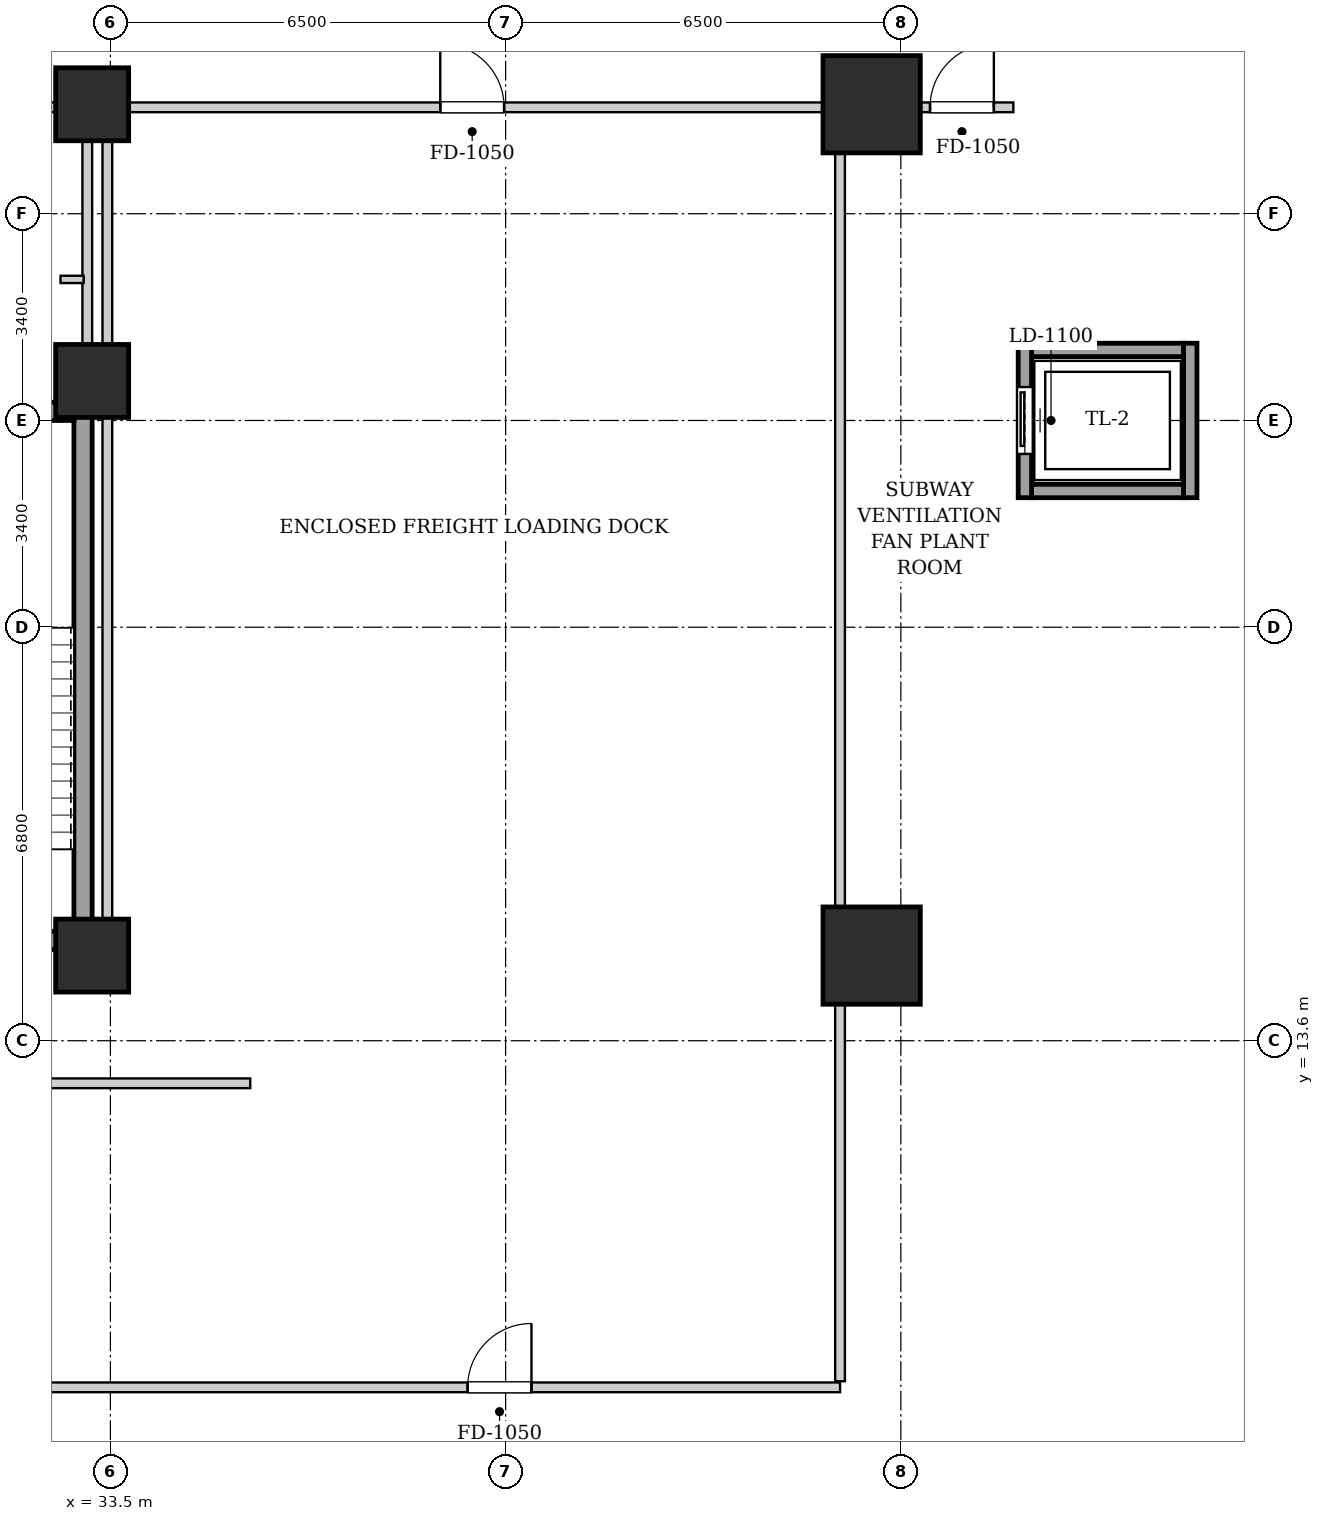
"""IFC4 building model, lengths in metres.
Left out: names, types, materials, properties, quantities, classifications, styles, units other than length and angle.
Written with IfcOpenShell. Run it as: python <this file> out.ifc"""

import sys

from ifc_helpers import new_model, si_unit, direction, frame, frame_2d, origin, origin_2d, place, context, subcontext, project, spatial, rectangle, extrude, element, fill, save


model = new_model("IFC4")
c1 = context("Model", 3, precision=1e-05, world=origin(), true_north=direction((0.0, 1.0)))
c2 = subcontext(c1, "Body", "Model", "MODEL_VIEW")
j1 = project(units=[si_unit("LENGTHUNIT", "METRE"), si_unit("PLANEANGLEUNIT", "RADIAN")], contexts=[c1])
p1 = place(None, origin())
s1 = spatial("IfcSite", under=j1, at=p1, CompositionType="ELEMENT")
p2 = place(p1, origin())
s2 = spatial("IfcBuilding", under=s1, at=p2, CompositionType="ELEMENT")
p3 = place(p2, frame((0.0, 0.0, -4.8)))
s3 = spatial("IfcBuildingStorey", under=s2, at=p3, CompositionType="ELEMENT", Elevation=-4.8)
for number, where, z_axis, x_axis in (
    (1, (46.02, 15.0, 0.0), (0.0, 0.0, 1.0), (1.0, 0.0, 0.0)),
    (2, (46.02, 29.0, 0.0), (0.0, 0.0, 1.0), (1.0, 0.0, 0.0)),
):
    element("IfcColumn", number, at=place(p3, frame(where, z_axis=z_axis, x_axis=x_axis)), inside=s3, PredefinedType="COLUMN", context=c2, shape_type="SweptSolid", body=[
        extrude(rectangle(XDim=1.6, YDim=1.6, at=origin_2d()), origin(), (0.0, 0.0, 1.0), 4.8),
    ])
for number, where, z_axis, x_axis in (
    (3, (33.2, 15.0, 0.0), (0.0, 0.0, 1.0), (1.0, 0.0, 0.0)),
    (4, (33.2, 29.0, 0.0), (0.0, 0.0, 1.0), (1.0, 0.0, 0.0)),
    (5, (33.2, 24.45, 0.0), (0.0, 0.0, 1.0), (1.0, 0.0, 0.0)),
):
    element("IfcColumn", number, at=place(p3, frame(where, z_axis=z_axis, x_axis=x_axis)), inside=s3, PredefinedType="COLUMN", context=c2, shape_type="SweptSolid", body=[
        extrude(rectangle(XDim=1.2, YDim=1.2, at=origin_2d()), origin(), (0.0, 0.0, 1.0), 4.8),
    ])
p4 = place(p3, frame((33.05, 15.1, 0.0), z_axis=(0.0, 0.0, 1.0), x_axis=(0.0, 1.0, 0.0)))
e6 = element("IfcWall", 6, at=p4, inside=s3, PredefinedType="SHEAR", context=c2, shape_type="SweptSolid", body=[
    extrude(rectangle(XDim=9.0, YDim=0.3, at=frame_2d((4.5, 0.0))), origin(), (0.0, 0.0, 1.0), 4.48),
])
p5 = place(p3, frame((30.05, 23.95, 0.0), z_axis=(0.0, 0.0, 1.0), x_axis=(1.0, 0.0, 0.0)))
e7 = element("IfcWall", 7, at=p5, inside=s3, PredefinedType="SHEAR", context=c2, shape_type="SweptSolid", body=[
    extrude(rectangle(XDim=2.85, YDim=0.3, at=frame_2d((1.425, 0.0))), origin(), (0.0, 0.0, 1.0), 4.48),
])
p6 = place(p3, frame((30.05, 15.25, 0.0), z_axis=(0.0, 0.0, 1.0), x_axis=(1.0, 0.0, 0.0)))
e8 = element("IfcWall", 8, at=p6, inside=s3, PredefinedType="SHEAR", context=c2, shape_type="SweptSolid", body=[
    extrude(rectangle(XDim=2.85, YDim=0.3, at=frame_2d((1.425, 0.0))), origin(), (0.0, 0.0, 1.0), 4.48),
])
p7 = place(p6, frame((0.86, 0.0, 0.0)))
e9 = element("IfcOpeningElement", 9, at=p7, cuts=e8, PredefinedType="OPENING", context=c2, shape_type="SweptSolid", body=[
    extrude(rectangle(XDim=1.1, YDim=2.05, at=frame_2d((0.55, 1.025))), frame((0.0, 0.16, 0.0), z_axis=(0.0, -1.0, 0.0), x_axis=(1.0, 0.0, 0.0)), (0.0, 0.0, 1.0), 0.32),
])
for number, where, z_axis, x_axis in (
    (10, (48.65, 22.64, 0.0), (0.0, 0.0, 1.0), (1.0, 0.0, 0.0)),
    (11, (48.65, 24.96, 0.0), (0.0, 0.0, 1.0), (1.0, 0.0, 0.0)),
):
    element("IfcWall", number, at=place(p3, frame(where, z_axis=z_axis, x_axis=x_axis)), inside=s3, PredefinedType="SHEAR", context=c2, shape_type="SweptSolid", body=[
        extrude(rectangle(XDim=2.5, YDim=0.22, at=frame_2d((1.25, 0.0))), origin(), (0.0, 0.0, 1.0), 4.48),
    ])
p8 = place(p3, frame((48.54, 22.53, 0.0), z_axis=(0.0, 0.0, 1.0), x_axis=(0.0, 1.0, 0.0)))
e12 = element("IfcWall", 12, at=p8, inside=s3, PredefinedType="SHEAR", context=c2, shape_type="SweptSolid", body=[
    extrude(rectangle(XDim=2.54, YDim=0.22, at=frame_2d((1.27, 0.0))), origin(), (0.0, 0.0, 1.0), 4.48),
])
p9 = place(p8, frame((0.72, 0.0, 0.0)))
e13 = element("IfcOpeningElement", 13, at=p9, cuts=e12, PredefinedType="OPENING", context=c2, shape_type="SweptSolid", body=[
    extrude(rectangle(XDim=1.1, YDim=2.15, at=frame_2d((0.55, 1.075))), frame((0.0, 0.12, 0.0), z_axis=(0.0, -1.0, 0.0), x_axis=(1.0, 0.0, 0.0)), (0.0, 0.0, 1.0), 0.24),
])
p10 = place(p3, frame((51.26, 22.53, 0.0), z_axis=(0.0, 0.0, 1.0), x_axis=(0.0, 1.0, 0.0)))
e14 = element("IfcWall", 14, at=p10, inside=s3, PredefinedType="SHEAR", context=c2, shape_type="SweptSolid", body=[
    extrude(rectangle(XDim=2.54, YDim=0.22, at=frame_2d((1.27, 0.0))), origin(), (0.0, 0.0, 1.0), 4.48),
])
p11 = place(p3, frame((33.12, 24.12, 0.0), z_axis=(0.0, 0.0, 1.0), x_axis=(0.0, 1.0, 0.0)))
e15 = element("IfcWall", 15, at=p11, inside=s3, PredefinedType="PARTITIONING", context=c2, shape_type="SweptSolid", body=[
    extrude(rectangle(XDim=4.76, YDim=0.16, at=frame_2d((2.38, 0.0))), origin(), (0.0, 0.0, 1.0), 4.48),
])
p12 = place(p3, frame((32.68, 26.12, 0.0), z_axis=(0.0, 0.0, 1.0), x_axis=(1.0, 0.0, 0.0)))
e16 = element("IfcWall", 16, at=p12, inside=s3, PredefinedType="PARTITIONING", context=c2, shape_type="SweptSolid", body=[
    extrude(rectangle(XDim=0.38, YDim=0.12, at=frame_2d((0.19, 0.0))), origin(), (0.0, 0.0, 1.0), 4.48),
])
p13 = place(p3, frame((30.08, 28.95, 0.0), z_axis=(0.0, 0.0, 1.0), x_axis=(1.0, 0.0, 0.0)))
e17 = element("IfcWall", 17, at=p13, inside=s3, PredefinedType="PARTITIONING", context=c2, shape_type="SweptSolid", body=[
    extrude(rectangle(XDim=2.96, YDim=0.16, at=frame_2d((1.48, 0.0))), origin(), (0.0, 0.0, 1.0), 4.48),
])
p14 = place(p13, frame((1.045, 0.0, 0.0)))
e18 = element("IfcOpeningElement", 18, at=p14, cuts=e17, PredefinedType="OPENING", context=c2, shape_type="SweptSolid", body=[
    extrude(rectangle(XDim=0.86, YDim=2.05, at=frame_2d((0.43, 1.025))), frame((0.0, 0.09, 0.0), z_axis=(0.0, -1.0, 0.0), x_axis=(1.0, 0.0, 0.0)), (0.0, 0.0, 1.0), 0.18),
])
p15 = place(p3, frame((8.4, 12.9, 0.0), z_axis=(0.0, 0.0, 1.0), x_axis=(1.0, 0.0, 0.0)))
e19 = element("IfcWall", 19, at=p15, inside=s3, PredefinedType="PARTITIONING", context=c2, shape_type="SweptSolid", body=[
    extrude(rectangle(XDim=27.4, YDim=0.16, at=frame_2d((13.7, 0.0))), origin(), (0.0, 0.0, 1.0), 4.48),
])
p16 = place(p15, frame((10.05, 0.0, 0.0)))
e20 = element("IfcOpeningElement", 20, at=p16, cuts=e19, PredefinedType="OPENING", context=c2, shape_type="SweptSolid", body=[
    extrude(rectangle(XDim=0.9, YDim=2.05, at=frame_2d((0.45, 1.025))), frame((0.0, 0.09, 0.0), z_axis=(0.0, -1.0, 0.0), x_axis=(1.0, 0.0, 0.0)), (0.0, 0.0, 1.0), 0.18),
])
p17 = place(p3, frame((8.4, 7.9, 0.0), z_axis=(0.0, 0.0, 1.0), x_axis=(1.0, 0.0, 0.0)))
e21 = element("IfcWall", 21, at=p17, inside=s3, PredefinedType="PARTITIONING", context=c2, shape_type="SweptSolid", body=[
    extrude(rectangle(XDim=37.1, YDim=0.16, at=frame_2d((18.55, 0.0))), origin(), (0.0, 0.0, 1.0), 4.48),
])
p18 = place(p17, frame((30.975, 0.0, 0.0)))
e22 = element("IfcOpeningElement", 22, at=p18, cuts=e21, PredefinedType="OPENING", context=c2, shape_type="SweptSolid", body=[
    extrude(rectangle(XDim=1.05, YDim=2.05, at=frame_2d((0.525, 1.025))), frame((0.0, 0.09, 0.0), z_axis=(0.0, -1.0, 0.0), x_axis=(1.0, 0.0, 0.0)), (0.0, 0.0, 1.0), 0.18),
])
p19 = place(p3, frame((33.45, 28.95, 0.0), z_axis=(0.0, 0.0, 1.0), x_axis=(1.0, 0.0, 0.0)))
e23 = element("IfcWall", 23, at=p19, inside=s3, PredefinedType="PARTITIONING", context=c2, shape_type="SweptSolid", body=[
    extrude(rectangle(XDim=12.05, YDim=0.16, at=frame_2d((6.025, 0.0))), origin(), (0.0, 0.0, 1.0), 3.565),
])
p20 = place(p19, frame((5.475, 0.0, 0.0)))
e24 = element("IfcOpeningElement", 24, at=p20, cuts=e23, PredefinedType="OPENING", context=c2, shape_type="SweptSolid", body=[
    extrude(rectangle(XDim=1.05, YDim=2.05, at=frame_2d((0.525, 1.025))), frame((0.0, 0.09, 0.0), z_axis=(0.0, -1.0, 0.0), x_axis=(1.0, 0.0, 0.0)), (0.0, 0.0, 1.0), 0.18),
])
p21 = place(p3, frame((33.45, 15.1, 0.0), z_axis=(0.0, 0.0, 1.0), x_axis=(0.0, 1.0, 0.0)))
e25 = element("IfcWall", 25, at=p21, inside=s3, PredefinedType="PARTITIONING", context=c2, shape_type="SweptSolid", body=[
    extrude(rectangle(XDim=13.78, YDim=0.16, at=frame_2d((6.89, 0.0))), origin(), (0.0, 0.0, 1.0), 4.48),
])
p22 = place(p3, frame((45.5, 8.0, 0.0), z_axis=(0.0, 0.0, 1.0), x_axis=(0.0, 1.0, 0.0)))
e26 = element("IfcWall", 26, at=p22, inside=s3, PredefinedType="PARTITIONING", context=c2, shape_type="SweptSolid", body=[
    extrude(rectangle(XDim=20.95, YDim=0.16, at=frame_2d((10.475, 0.0))), origin(), (0.0, 0.0, 1.0), 4.48),
])
p23 = place(p3, frame((45.6, 28.95, 0.0), z_axis=(0.0, 0.0, 1.0), x_axis=(1.0, 0.0, 0.0)))
e27 = element("IfcWall", 27, at=p23, inside=s3, PredefinedType="PARTITIONING", context=c2, shape_type="SweptSolid", body=[
    extrude(rectangle(XDim=2.75, YDim=0.16, at=frame_2d((1.375, 0.0))), origin(), (0.0, 0.0, 1.0), 3.565),
])
p24 = place(p23, frame((1.38, 0.0, 0.0)))
e28 = element("IfcOpeningElement", 28, at=p24, cuts=e27, PredefinedType="OPENING", context=c2, shape_type="SweptSolid", body=[
    extrude(rectangle(XDim=1.05, YDim=2.05, at=frame_2d((0.525, 1.025))), frame((0.0, 0.09, 0.0), z_axis=(0.0, -1.0, 0.0), x_axis=(1.0, 0.0, 0.0)), (0.0, 0.0, 1.0), 0.18),
])
p25 = place(p9, origin())
e29 = element("IfcDoor", 29, at=p25, inside=s3, OperationType="SLIDING_TO_LEFT", PredefinedType="DOOR", context=c2, shape_type="SweptSolid", body=[
    extrude(rectangle(XDim=1.1, YDim=2.15, at=frame_2d((0.55, 1.075))), frame((0.0, 0.025, 0.0), z_axis=(0.0, -1.0, 0.0), x_axis=(1.0, 0.0, 0.0)), (0.0, 0.0, 1.0), 0.05),
])
fill(e13, e29)
p26 = place(p18, origin())
e30 = element("IfcDoor", 30, at=p26, inside=s3, OperationType="SINGLE_SWING_RIGHT", PredefinedType="DOOR", context=c2, shape_type="SweptSolid", body=[
    extrude(rectangle(XDim=1.05, YDim=2.05, at=frame_2d((0.525, 1.025))), frame((0.0, 0.025, 0.0), z_axis=(0.0, -1.0, 0.0), x_axis=(1.0, 0.0, 0.0)), (0.0, 0.0, 1.0), 0.05),
])
fill(e22, e30)
p27 = place(p20, origin())
e31 = element("IfcDoor", 31, at=p27, inside=s3, OperationType="SINGLE_SWING_LEFT", PredefinedType="DOOR", context=c2, shape_type="SweptSolid", body=[
    extrude(rectangle(XDim=1.05, YDim=2.05, at=frame_2d((0.525, 1.025))), frame((0.0, 0.025, 0.0), z_axis=(0.0, -1.0, 0.0), x_axis=(1.0, 0.0, 0.0)), (0.0, 0.0, 1.0), 0.05),
])
fill(e24, e31)
p28 = place(p24, origin())
e32 = element("IfcDoor", 32, at=p28, inside=s3, OperationType="SINGLE_SWING_RIGHT", PredefinedType="DOOR", context=c2, shape_type="SweptSolid", body=[
    extrude(rectangle(XDim=1.05, YDim=2.05, at=frame_2d((0.525, 1.025))), frame((0.0, 0.025, 0.0), z_axis=(0.0, -1.0, 0.0), x_axis=(1.0, 0.0, 0.0)), (0.0, 0.0, 1.0), 0.05),
])
fill(e28, e32)
save(model, sys.argv[1])
